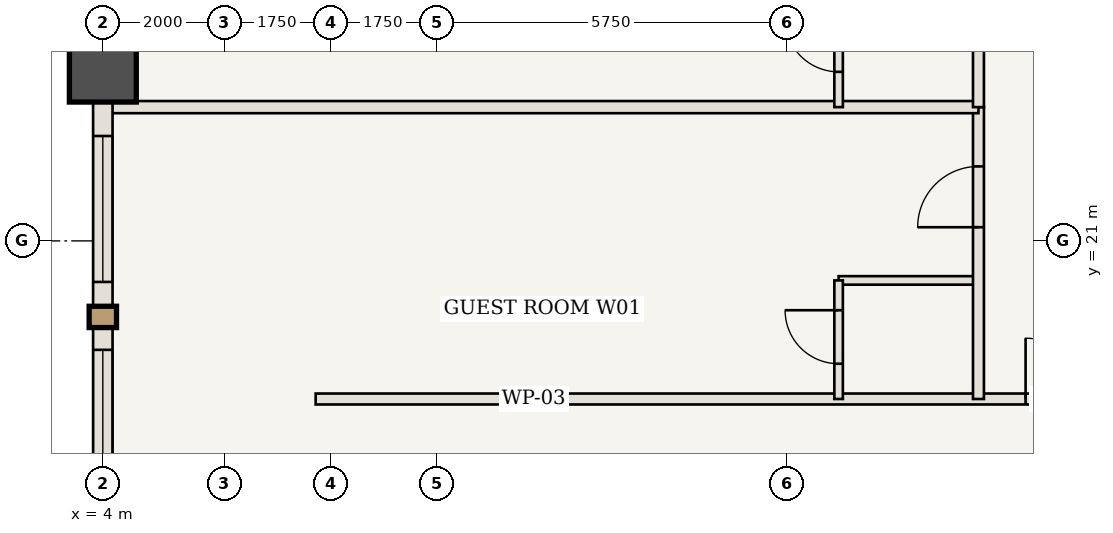
"""IFC4 building model, lengths in metres.
Left out: names, types, materials, properties, quantities, classifications, styles, units other than length and angle.
Written with IfcOpenShell. Run it as: python <this file> out.ifc"""

import sys

from ifc_helpers import new_model, si_unit, direction, frame, frame_2d, origin, origin_2d, place, context, subcontext, project, spatial, rectangle, extrude, element, fill, save


model = new_model("IFC4")
c1 = context("Model", 3, precision=1e-05, world=origin(), true_north=direction((0.0, 1.0)))
c2 = subcontext(c1, "Body", "Model", "MODEL_VIEW")
j1 = project(units=[si_unit("LENGTHUNIT", "METRE"), si_unit("PLANEANGLEUNIT", "RADIAN")], contexts=[c1])
p1 = place(None, origin())
s1 = spatial("IfcSite", under=j1, at=p1, CompositionType="ELEMENT")
p2 = place(p1, origin())
s2 = spatial("IfcBuilding", under=s1, at=p2, CompositionType="ELEMENT")
p3 = place(p2, frame((0.0, 0.0, 45.85)))
s3 = spatial("IfcBuildingStorey", under=s2, at=p3, CompositionType="ELEMENT", Elevation=45.85)
p4 = place(p3, frame((4.0, 23.833, 0.0), z_axis=(0.0, 0.0, 1.0), x_axis=(1.0, 0.0, 0.0)))
e1 = element("IfcColumn", 1, at=p4, inside=s3, PredefinedType="COLUMN", context=c2, shape_type="SweptSolid", body=[
    extrude(rectangle(XDim=1.1, YDim=1.1, at=origin_2d()), origin(), (0.0, 0.0, 1.0), 3.5),
])
p5 = place(p3, frame((7.5, 18.4, 0.0), z_axis=(0.0, 0.0, 1.0), x_axis=(1.0, 0.0, 0.0)))
e2 = element("IfcWall", 2, at=p5, inside=s3, PredefinedType="STANDARD", context=c2, shape_type="SweptSolid", body=[
    extrude(rectangle(XDim=16.3, YDim=0.18, at=frame_2d((8.15, 0.0))), origin(), (0.0, 0.0, 1.0), 3.32),
])
p6 = place(p5, frame((11.675, 0.0, 0.0)))
e3 = element("IfcOpeningElement", 3, at=p6, cuts=e2, PredefinedType="OPENING", context=c2, shape_type="SweptSolid", body=[
    extrude(rectangle(XDim=1.0, YDim=2.15, at=frame_2d((0.5, 1.075))), frame((0.0, 0.1, 0.0), z_axis=(0.0, -1.0, 0.0), x_axis=(1.0, 0.0, 0.0)), (0.0, 0.0, 1.0), 0.2),
])
p7 = place(p3, frame((16.1, 20.35, 0.0), z_axis=(0.0, 0.0, 1.0), x_axis=(1.0, 0.0, 0.0)))
e4 = element("IfcWall", 4, at=p7, inside=s3, PredefinedType="STANDARD", context=c2, shape_type="SweptSolid", body=[
    extrude(rectangle(XDim=2.3, YDim=0.14, at=frame_2d((1.15, 0.0))), origin(), (0.0, 0.0, 1.0), 3.32),
])
p8 = place(p3, frame((16.1, 18.4, 0.0), z_axis=(0.0, 0.0, 1.0), x_axis=(0.0, 1.0, 0.0)))
e5 = element("IfcWall", 5, at=p8, inside=s3, PredefinedType="STANDARD", context=c2, shape_type="SweptSolid", body=[
    extrude(rectangle(XDim=1.95, YDim=0.14, at=frame_2d((0.975, 0.0))), origin(), (0.0, 0.0, 1.0), 3.32),
])
p9 = place(p8, frame((0.58, 0.0, 0.0)))
e6 = element("IfcOpeningElement", 6, at=p9, cuts=e5, PredefinedType="OPENING", context=c2, shape_type="SweptSolid", body=[
    extrude(rectangle(XDim=0.88, YDim=2.1, at=frame_2d((0.44, 1.05))), frame((0.0, 0.08, 0.0), z_axis=(0.0, -1.0, 0.0), x_axis=(1.0, 0.0, 0.0)), (0.0, 0.0, 1.0), 0.16),
])
p10 = place(p3, frame((18.4, 18.4, 0.0), z_axis=(0.0, 0.0, 1.0), x_axis=(0.0, 1.0, 0.0)))
e7 = element("IfcWall", 7, at=p10, inside=s3, PredefinedType="STANDARD", context=c2, shape_type="SweptSolid", body=[
    extrude(rectangle(XDim=4.8, YDim=0.18, at=frame_2d((2.4, 0.0))), origin(), (0.0, 0.0, 1.0), 3.32),
])
p11 = place(p10, frame((2.825, 0.0, 0.0)))
e8 = element("IfcOpeningElement", 8, at=p11, cuts=e7, PredefinedType="OPENING", context=c2, shape_type="SweptSolid", body=[
    extrude(rectangle(XDim=1.0, YDim=2.15, at=frame_2d((0.5, 1.075))), frame((0.0, 0.1, 0.0), z_axis=(0.0, -1.0, 0.0), x_axis=(1.0, 0.0, 0.0)), (0.0, 0.0, 1.0), 0.2),
])
p12 = place(p3, frame((4.06, 23.2, 0.0), z_axis=(0.0, 0.0, 1.0), x_axis=(1.0, 0.0, 0.0)))
e9 = element("IfcWall", 9, at=p12, inside=s3, PredefinedType="STANDARD", context=c2, shape_type="SweptSolid", body=[
    extrude(rectangle(XDim=14.34, YDim=0.2, at=frame_2d((7.17, 0.0))), origin(), (0.0, 0.0, 1.0), 3.32),
])
p13 = place(p3, frame((16.1, 23.2, 0.0), z_axis=(0.0, 0.0, 1.0), x_axis=(0.0, 1.0, 0.0)))
e10 = element("IfcWall", 10, at=p13, inside=s3, PredefinedType="STANDARD", context=c2, shape_type="SweptSolid", body=[
    extrude(rectangle(XDim=1.95, YDim=0.14, at=frame_2d((0.975, 0.0))), origin(), (0.0, 0.0, 1.0), 3.32),
])
p14 = place(p13, frame((0.58, 0.0, 0.0)))
e11 = element("IfcOpeningElement", 11, at=p14, cuts=e10, PredefinedType="OPENING", context=c2, shape_type="SweptSolid", body=[
    extrude(rectangle(XDim=0.88, YDim=2.1, at=frame_2d((0.44, 1.05))), frame((0.0, 0.08, 0.0), z_axis=(0.0, -1.0, 0.0), x_axis=(1.0, 0.0, 0.0)), (0.0, 0.0, 1.0), 0.16),
])
p15 = place(p3, frame((18.4, 23.2, 0.0), z_axis=(0.0, 0.0, 1.0), x_axis=(0.0, 1.0, 0.0)))
e12 = element("IfcWall", 12, at=p15, inside=s3, PredefinedType="STANDARD", context=c2, shape_type="SweptSolid", body=[
    extrude(rectangle(XDim=4.7, YDim=0.18, at=frame_2d((2.35, 0.0))), origin(), (0.0, 0.0, 1.0), 3.32),
])
p16 = place(p15, frame((2.775, 0.0, 0.0)))
e13 = element("IfcOpeningElement", 13, at=p16, cuts=e12, PredefinedType="OPENING", context=c2, shape_type="SweptSolid", body=[
    extrude(rectangle(XDim=1.0, YDim=2.15, at=frame_2d((0.5, 1.075))), frame((0.0, 0.1, 0.0), z_axis=(0.0, -1.0, 0.0), x_axis=(1.0, 0.0, 0.0)), (0.0, 0.0, 1.0), 0.2),
])
p17 = place(p3, frame((4.0, 15.667, 0.0), z_axis=(0.0, 0.0, 1.0), x_axis=(0.0, 1.0, 0.0)))
e14 = element("IfcWall", 14, at=p17, inside=s3, PredefinedType="USERDEFINED", context=c2, shape_type="SweptSolid", body=[
    extrude(rectangle(XDim=8.167, YDim=0.32, at=frame_2d((4.083, 0.0))), origin(), (0.0, 0.0, 1.0), 2.52),
])
p18 = place(p17, frame((0.742, 0.0, 0.85)))
e15 = element("IfcOpeningElement", 15, at=p18, cuts=e14, PredefinedType="OPENING", context=c2, shape_type="SweptSolid", body=[
    extrude(rectangle(XDim=2.8, YDim=1.47, at=frame_2d((1.4, 0.735))), frame((0.0, 0.17, 0.0), z_axis=(0.0, -1.0, 0.0), x_axis=(1.0, 0.0, 0.0)), (0.0, 0.0, 1.0), 0.34),
])
p19 = place(p17, frame((4.658, 0.0, 0.85)))
e16 = element("IfcOpeningElement", 16, at=p19, cuts=e14, PredefinedType="OPENING", context=c2, shape_type="SweptSolid", body=[
    extrude(rectangle(XDim=2.4, YDim=1.47, at=frame_2d((1.2, 0.735))), frame((0.0, 0.17, 0.0), z_axis=(0.0, -1.0, 0.0), x_axis=(1.0, 0.0, 0.0)), (0.0, 0.0, 1.0), 0.34),
])
p20 = place(p3, frame((4.0, 23.833, 0.0), z_axis=(0.0, 0.0, 1.0), x_axis=(0.0, 1.0, 0.0)))
e17 = element("IfcWall", 17, at=p20, inside=s3, PredefinedType="USERDEFINED", context=c2, shape_type="SweptSolid", body=[
    extrude(rectangle(XDim=8.167, YDim=0.32, at=frame_2d((4.083, 0.0))), origin(), (0.0, 0.0, 1.0), 2.52),
])
p21 = place(p20, frame((0.983, 0.0, 0.85)))
e18 = element("IfcOpeningElement", 18, at=p21, cuts=e17, PredefinedType="OPENING", context=c2, shape_type="SweptSolid", body=[
    extrude(rectangle(XDim=2.4, YDim=1.47, at=frame_2d((1.2, 0.735))), frame((0.0, 0.17, 0.0), z_axis=(0.0, -1.0, 0.0), x_axis=(1.0, 0.0, 0.0)), (0.0, 0.0, 1.0), 0.34),
])
p22 = place(p20, frame((4.767, 0.0, 0.85)))
e19 = element("IfcOpeningElement", 19, at=p22, cuts=e17, PredefinedType="OPENING", context=c2, shape_type="SweptSolid", body=[
    extrude(rectangle(XDim=2.4, YDim=1.47, at=frame_2d((1.2, 0.735))), frame((0.0, 0.17, 0.0), z_axis=(0.0, -1.0, 0.0), x_axis=(1.0, 0.0, 0.0)), (0.0, 0.0, 1.0), 0.34),
])
p23 = place(p6, origin())
e20 = element("IfcDoor", 20, at=p23, inside=s3, OperationType="SINGLE_SWING_LEFT", PredefinedType="DOOR", context=c2, shape_type="SweptSolid", body=[
    extrude(rectangle(XDim=1.0, YDim=2.15, at=frame_2d((0.5, 1.075))), frame((0.0, 0.025, 0.0), z_axis=(0.0, -1.0, 0.0), x_axis=(1.0, 0.0, 0.0)), (0.0, 0.0, 1.0), 0.05),
])
fill(e3, e20)
p24 = place(p9, origin())
e21 = element("IfcDoor", 21, at=p24, inside=s3, OperationType="SINGLE_SWING_RIGHT", PredefinedType="DOOR", context=c2, shape_type="SweptSolid", body=[
    extrude(rectangle(XDim=0.88, YDim=2.1, at=frame_2d((0.44, 1.05))), frame((0.0, 0.025, 0.0), z_axis=(0.0, -1.0, 0.0), x_axis=(1.0, 0.0, 0.0)), (0.0, 0.0, 1.0), 0.05),
])
fill(e6, e21)
p25 = place(p11, origin())
e22 = element("IfcDoor", 22, at=p25, inside=s3, OperationType="SINGLE_SWING_LEFT", PredefinedType="DOOR", context=c2, shape_type="SweptSolid", body=[
    extrude(rectangle(XDim=1.0, YDim=2.15, at=frame_2d((0.5, 1.075))), frame((0.0, 0.025, 0.0), z_axis=(0.0, -1.0, 0.0), x_axis=(1.0, 0.0, 0.0)), (0.0, 0.0, 1.0), 0.05),
])
fill(e8, e22)
p26 = place(p14, origin())
e23 = element("IfcDoor", 23, at=p26, inside=s3, OperationType="SINGLE_SWING_RIGHT", PredefinedType="DOOR", context=c2, shape_type="SweptSolid", body=[
    extrude(rectangle(XDim=0.88, YDim=2.1, at=frame_2d((0.44, 1.05))), frame((0.0, 0.025, 0.0), z_axis=(0.0, -1.0, 0.0), x_axis=(1.0, 0.0, 0.0)), (0.0, 0.0, 1.0), 0.05),
])
fill(e11, e23)
p27 = place(p18, origin())
e24 = element("IfcWindow", 24, at=p27, inside=s3, PartitioningType="SINGLE_PANEL", PredefinedType="WINDOW", context=c2, shape_type="SweptSolid", body=[
    extrude(rectangle(XDim=2.8, YDim=1.47, at=frame_2d((1.4, 0.735))), frame((0.0, 0.03, 0.0), z_axis=(0.0, -1.0, 0.0), x_axis=(1.0, 0.0, 0.0)), (0.0, 0.0, 1.0), 0.06),
])
fill(e15, e24)
p28 = place(p19, origin())
e25 = element("IfcWindow", 25, at=p28, inside=s3, PartitioningType="SINGLE_PANEL", PredefinedType="WINDOW", context=c2, shape_type="SweptSolid", body=[
    extrude(rectangle(XDim=2.4, YDim=1.47, at=frame_2d((1.2, 0.735))), frame((0.0, 0.03, 0.0), z_axis=(0.0, -1.0, 0.0), x_axis=(1.0, 0.0, 0.0)), (0.0, 0.0, 1.0), 0.06),
])
fill(e16, e25)
save(model, sys.argv[1])
